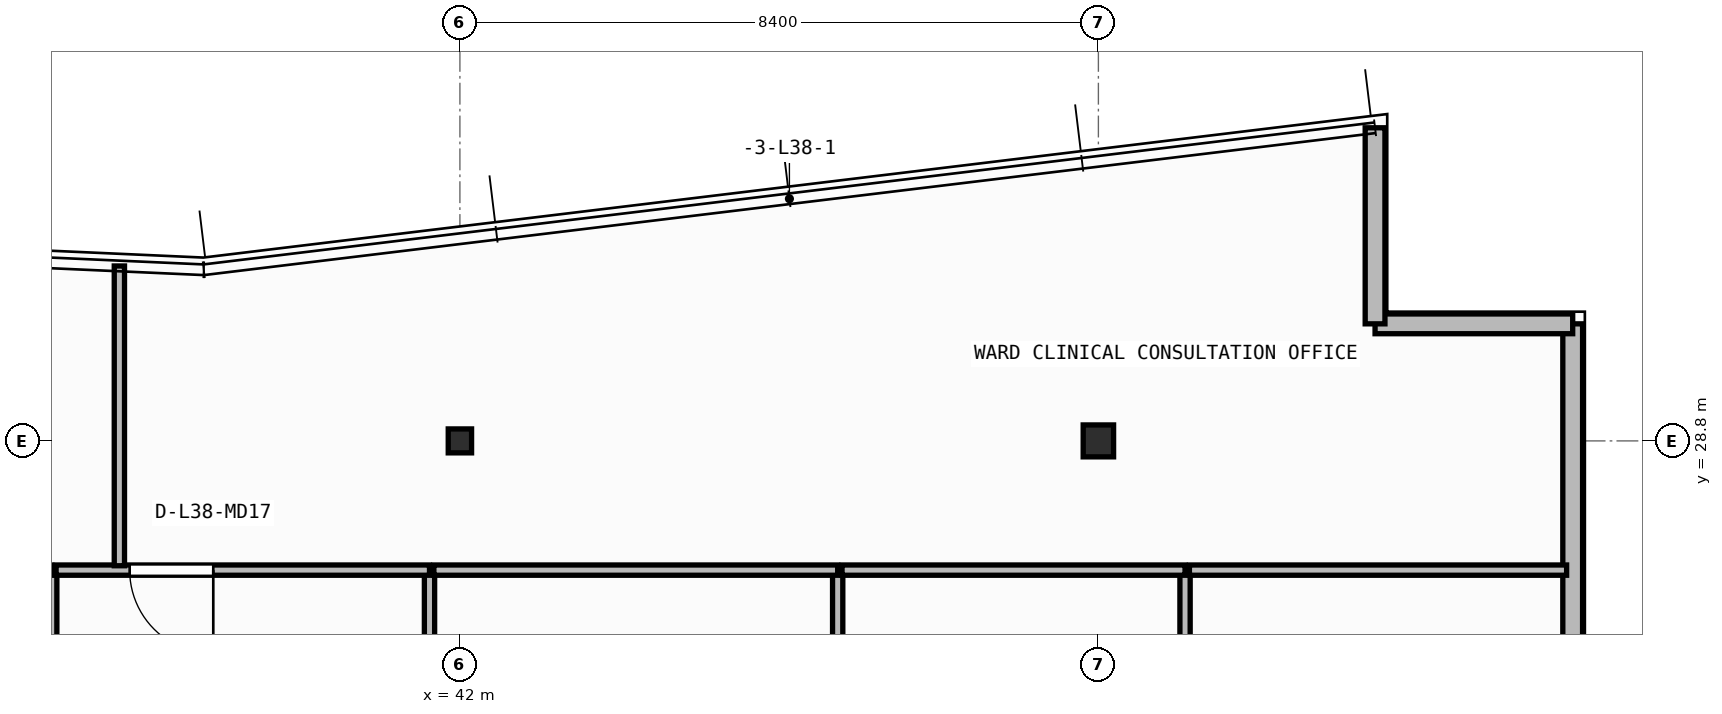
"""IFC4 building model, lengths in metres.
Left out: names, types, materials, properties, quantities, classifications, styles, units other than length and angle.
Written with IfcOpenShell. Run it as: python <this file> out.ifc"""

import sys

from ifc_helpers import new_model, si_unit, direction, frame, frame_2d, origin, origin_2d, place, context, subcontext, project, spatial, rectangle, i_section, extrude, element, fill, save


model = new_model("IFC4")
c1 = context("Model", 3, precision=1e-05, world=origin(), true_north=direction((0.0, 1.0)))
c2 = subcontext(c1, "Body", "Model", "MODEL_VIEW")
j1 = project(units=[si_unit("LENGTHUNIT", "METRE"), si_unit("PLANEANGLEUNIT", "RADIAN")], contexts=[c1])
p1 = place(None, origin())
s1 = spatial("IfcSite", under=j1, at=p1, CompositionType="ELEMENT")
p2 = place(p1, origin())
s2 = spatial("IfcBuilding", under=s1, at=p2, CompositionType="ELEMENT")
p3 = place(p2, frame((0.0, 0.0, 154.7)))
s3 = spatial("IfcBuildingStorey", under=s2, at=p3, CompositionType="ELEMENT", Elevation=154.7)
p4 = place(p3, frame((42.0, 28.8, 0.0), z_axis=(0.0, 0.0, 1.0), x_axis=(1.0, 0.0, 0.0)))
e1 = element("IfcColumn", 1, at=p4, inside=s3, PredefinedType="COLUMN", context=c2, shape_type="SweptSolid", body=[
    extrude(i_section(OverallWidth=0.307, OverallDepth=0.315, WebThickness=0.012, FlangeThickness=0.019, FilletRadius=0.017, at=origin_2d()), origin(), (0.0, 0.0, 1.0), 3.95),
])
p5 = place(p3, frame((50.4, 28.8, 0.0), z_axis=(0.0, 0.0, 1.0), x_axis=(1.0, 0.0, 0.0)))
e2 = element("IfcColumn", 2, at=p5, inside=s3, PredefinedType="COLUMN", context=c2, shape_type="SweptSolid", body=[
    extrude(i_section(OverallWidth=0.4, OverallDepth=0.42, WebThickness=0.025, FlangeThickness=0.04, at=origin_2d()), origin(), (0.0, 0.0, 1.0), 3.95),
])
p6 = place(p3, frame((56.64, 6.86, 0.0), z_axis=(0.0, 0.0, 1.0), x_axis=(0.0, 1.0, 0.0)))
e3 = element("IfcWall", 3, at=p6, inside=s3, PredefinedType="STANDARD", context=c2, shape_type="SweptSolid", body=[
    extrude(rectangle(XDim=23.48, YDim=0.26, at=frame_2d((11.74, 0.0))), origin(), (0.0, 0.0, 1.0), 3.71),
])
p7 = place(p6, frame((9.24, 0.0, 0.0)))
e4 = element("IfcOpeningElement", 4, at=p7, cuts=e3, PredefinedType="OPENING", context=c2, shape_type="SweptSolid", body=[
    extrude(rectangle(XDim=1.3, YDim=2.15, at=frame_2d((0.65, 1.075))), frame((0.0, 0.14, 0.0), z_axis=(0.0, -1.0, 0.0), x_axis=(1.0, 0.0, 0.0)), (0.0, 0.0, 1.0), 0.28),
])
p8 = place(p3, frame((56.64, 30.34, 0.0), z_axis=(0.0, 0.0, 1.0), x_axis=(-1.0, 0.0, 0.0)))
e5 = element("IfcWall", 5, at=p8, inside=s3, PredefinedType="STANDARD", context=c2, shape_type="SweptSolid", body=[
    extrude(rectangle(XDim=2.6, YDim=0.26, at=frame_2d((1.3, 0.0))), origin(), (0.0, 0.0, 1.0), 3.71),
])
p9 = place(p3, frame((54.04, 30.34, 0.0), z_axis=(0.0, 0.0, 1.0), x_axis=(0.0, 1.0, 0.0)))
e6 = element("IfcWall", 6, at=p9, inside=s3, PredefinedType="STANDARD", context=c2, shape_type="SweptSolid", body=[
    extrude(rectangle(XDim=2.579, YDim=0.26, at=frame_2d((1.29, 0.0))), origin(), (0.0, 0.0, 1.0), 3.71),
])
p10 = place(p3, frame((36.63, 20.715, 0.0), z_axis=(0.0, 0.0, 1.0), x_axis=(0.0, 1.0, 0.0)))
e7 = element("IfcWall", 7, at=p10, inside=s3, PredefinedType="PARTITIONING", context=c2, shape_type="SweptSolid", body=[
    extrude(rectangle(XDim=6.385, YDim=0.135, at=frame_2d((3.192, 0.0))), origin(), (0.0, 0.0, 1.0), 3.71),
])
p11 = place(p3, frame((41.6, 20.715, 0.0), z_axis=(0.0, 0.0, 1.0), x_axis=(0.0, 1.0, 0.0)))
e8 = element("IfcWall", 8, at=p11, inside=s3, PredefinedType="PARTITIONING", context=c2, shape_type="SweptSolid", body=[
    extrude(rectangle(XDim=6.385, YDim=0.135, at=frame_2d((3.192, 0.0))), origin(), (0.0, 0.0, 1.0), 3.152),
])
p12 = place(p3, frame((41.6, 27.1, 0.0), z_axis=(0.0, 0.0, 1.0), x_axis=(-1.0, 0.0, 0.0)))
e9 = element("IfcWall", 9, at=p12, inside=s3, PredefinedType="PARTITIONING", context=c2, shape_type="SweptSolid", body=[
    extrude(rectangle(XDim=4.913, YDim=0.135, at=frame_2d((2.456, 0.0))), origin(), (0.0, 0.0, 1.0), 3.71),
])
p13 = place(p12, frame((2.845, 0.0, 0.0)))
e10 = element("IfcOpeningElement", 10, at=p13, cuts=e9, PredefinedType="OPENING", context=c2, shape_type="SweptSolid", body=[
    extrude(rectangle(XDim=1.1, YDim=2.1, at=frame_2d((0.55, 1.05))), frame((0.0, 0.077, 0.0), z_axis=(0.0, -1.0, 0.0), x_axis=(1.0, 0.0, 0.0)), (0.0, 0.0, 1.0), 0.155),
])
p14 = place(p3, frame((46.97, 20.715, 0.0), z_axis=(0.0, 0.0, 1.0), x_axis=(0.0, 1.0, 0.0)))
e11 = element("IfcWall", 11, at=p14, inside=s3, PredefinedType="PARTITIONING", context=c2, shape_type="SweptSolid", body=[
    extrude(rectangle(XDim=6.385, YDim=0.135, at=frame_2d((3.192, 0.0))), origin(), (0.0, 0.0, 1.0), 3.71),
])
p15 = place(p3, frame((46.97, 27.1, 0.0), z_axis=(0.0, 0.0, 1.0), x_axis=(-1.0, 0.0, 0.0)))
e12 = element("IfcWall", 12, at=p15, inside=s3, PredefinedType="PARTITIONING", context=c2, shape_type="SweptSolid", body=[
    extrude(rectangle(XDim=5.312, YDim=0.135, at=frame_2d((2.656, 0.0))), origin(), (0.0, 0.0, 1.0), 3.71),
])
p16 = place(p3, frame((51.54, 20.715, 0.0), z_axis=(0.0, 0.0, 1.0), x_axis=(0.0, 1.0, 0.0)))
e13 = element("IfcWall", 13, at=p16, inside=s3, PredefinedType="PARTITIONING", context=c2, shape_type="SweptSolid", body=[
    extrude(rectangle(XDim=6.385, YDim=0.135, at=frame_2d((3.192, 0.0))), origin(), (0.0, 0.0, 1.0), 3.71),
])
p17 = place(p3, frame((51.54, 27.1, 0.0), z_axis=(0.0, 0.0, 1.0), x_axis=(-1.0, 0.0, 0.0)))
e14 = element("IfcWall", 14, at=p17, inside=s3, PredefinedType="PARTITIONING", context=c2, shape_type="SweptSolid", body=[
    extrude(rectangle(XDim=4.512, YDim=0.135, at=frame_2d((2.256, 0.0))), origin(), (0.0, 0.0, 1.0), 3.71),
])
p18 = place(p3, frame((56.56, 27.1, 0.0), z_axis=(0.0, 0.0, 1.0), x_axis=(-1.0, 0.0, 0.0)))
e15 = element("IfcWall", 15, at=p18, inside=s3, PredefinedType="PARTITIONING", context=c2, shape_type="SweptSolid", body=[
    extrude(rectangle(XDim=4.963, YDim=0.135, at=frame_2d((2.481, 0.0))), origin(), (0.0, 0.0, 1.0), 3.71),
])
p19 = place(p3, frame((37.52, 27.157, 0.0), z_axis=(0.0, 0.0, 1.0), x_axis=(0.0, 1.0, 0.0)))
e16 = element("IfcWall", 16, at=p19, inside=s3, PredefinedType="PARTITIONING", context=c2, shape_type="SweptSolid", body=[
    extrude(rectangle(XDim=3.944, YDim=0.135, at=frame_2d((1.972, 0.0))), origin(), (0.0, 0.0, 1.0), 3.71),
])
p20 = place(p13, origin())
e17 = element("IfcDoor", 17, at=p20, inside=s3, OperationType="SINGLE_SWING_LEFT", PredefinedType="DOOR", context=c2, shape_type="SweptSolid", body=[
    extrude(rectangle(XDim=1.1, YDim=2.1, at=frame_2d((0.55, 1.05))), frame((0.0, 0.025, 0.0), z_axis=(0.0, -1.0, 0.0), x_axis=(1.0, 0.0, 0.0)), (0.0, 0.0, 1.0), 0.05),
])
fill(e10, e17)
save(model, sys.argv[1])
